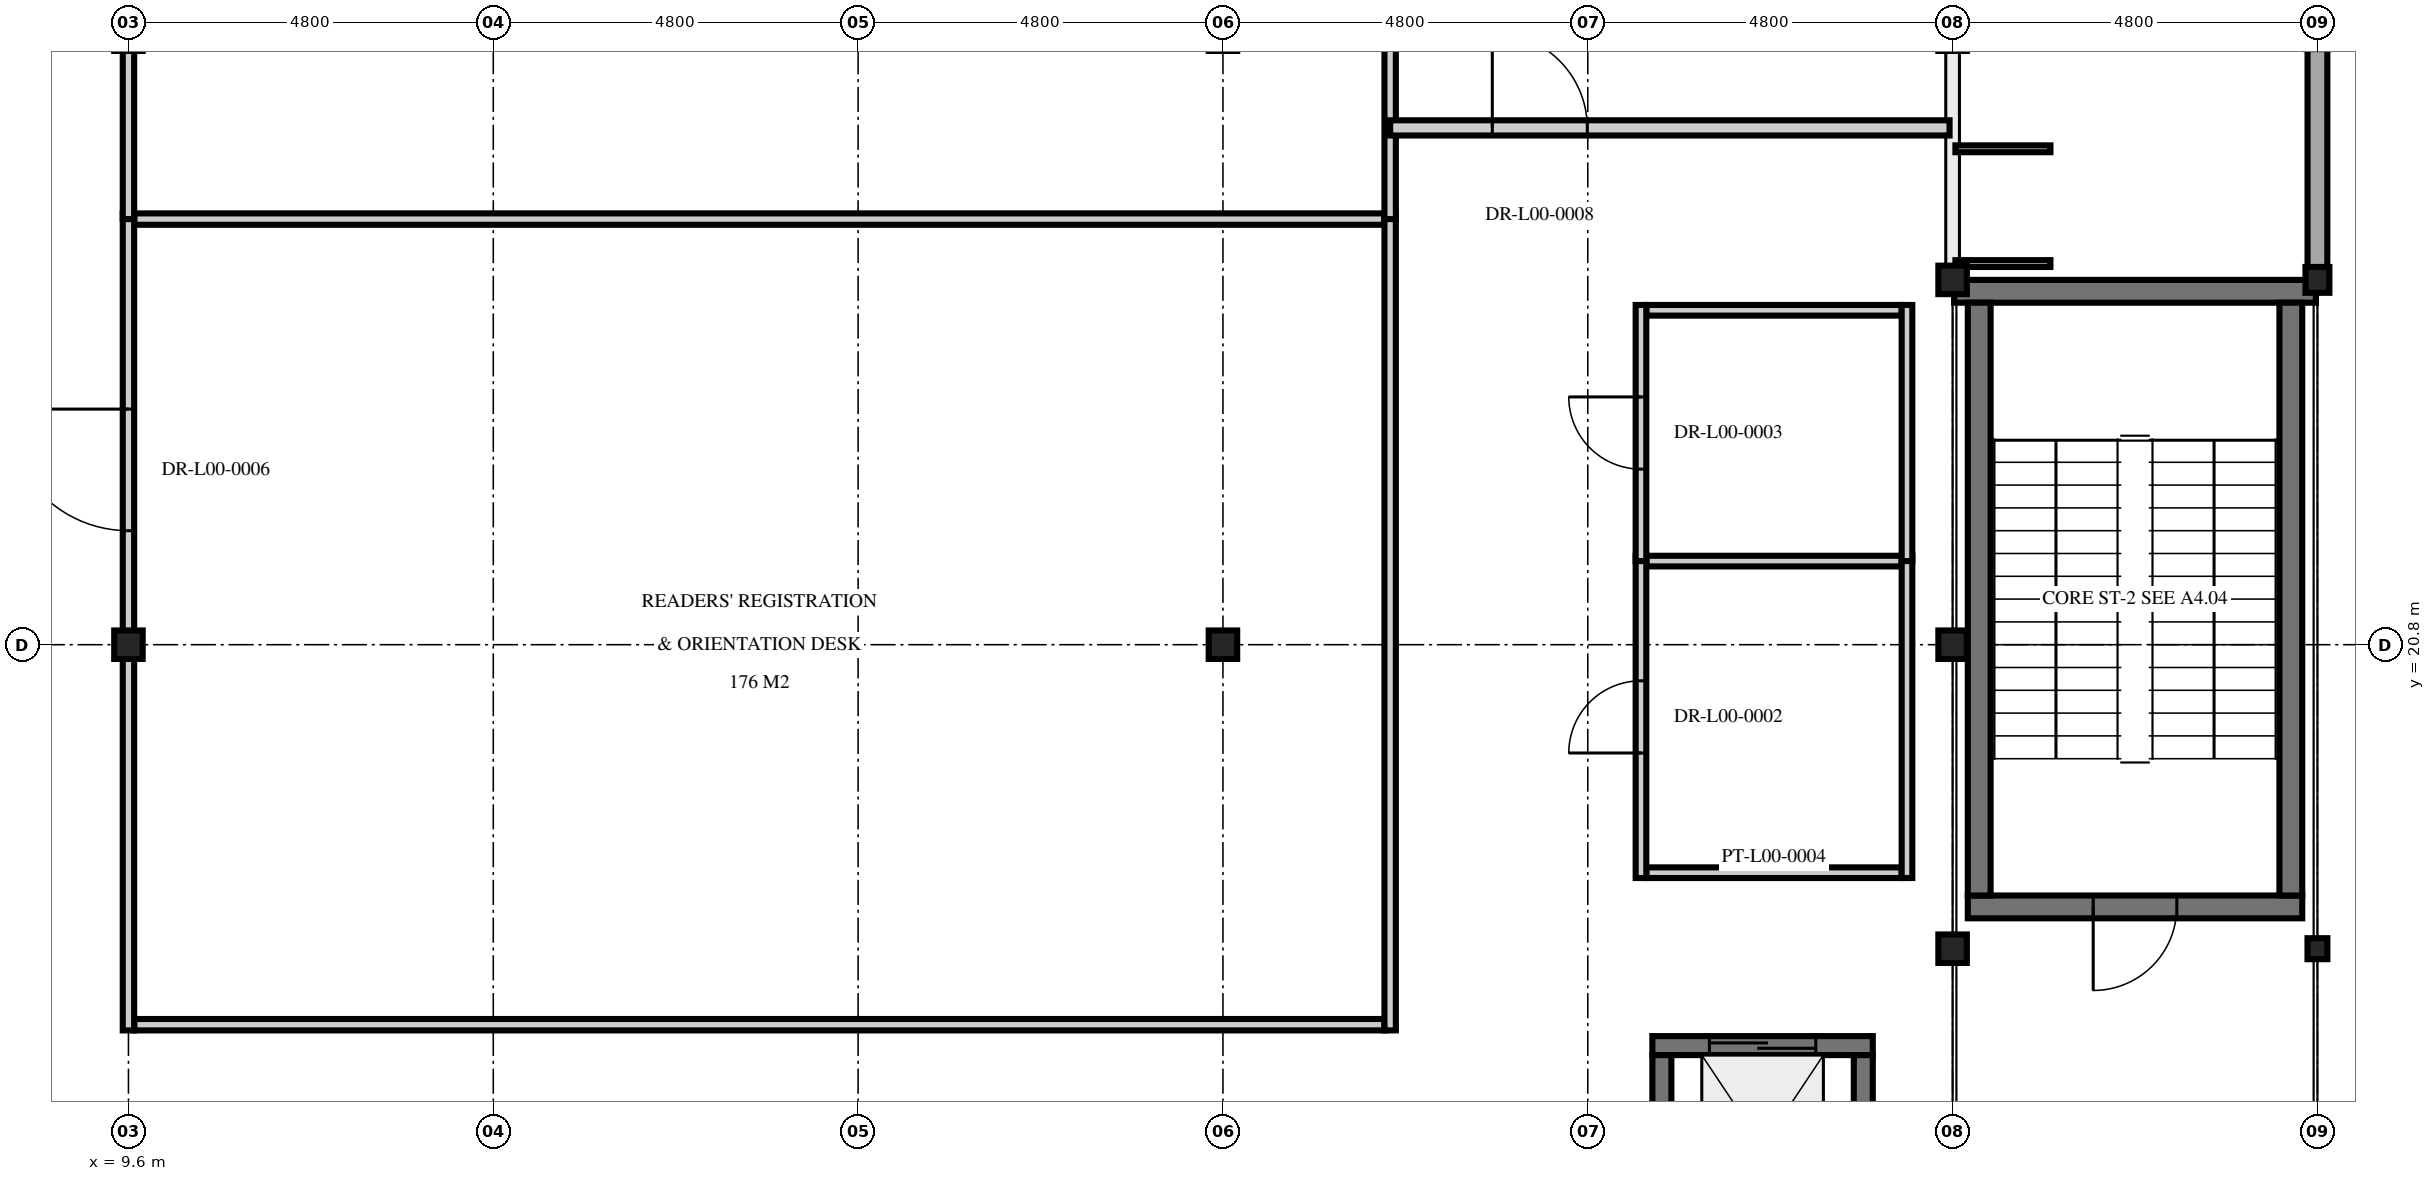
"""IFC4 building model, lengths in metres.
Left out: names, types, materials, properties, quantities, classifications, styles, units other than length and angle.
Written with IfcOpenShell. Run it as: python <this file> out.ifc"""

import sys

from ifc_helpers import new_model, si_unit, direction, frame, frame_2d, origin, origin_2d, place, context, subcontext, project, spatial, rectangle, i_section, extrude, element, fill, save


model = new_model("IFC4")
c1 = context("Model", 3, precision=1e-05, world=origin(), true_north=direction((0.0, 1.0)))
c2 = subcontext(c1, "Body", "Model", "MODEL_VIEW")
j1 = project(units=[si_unit("LENGTHUNIT", "METRE"), si_unit("PLANEANGLEUNIT", "RADIAN")], contexts=[c1])
p1 = place(None, origin())
s1 = spatial("IfcSite", under=j1, at=p1, CompositionType="ELEMENT")
p2 = place(p1, origin())
s2 = spatial("IfcBuilding", under=s1, at=p2, CompositionType="ELEMENT")
p3 = place(p2, origin())
s3 = spatial("IfcBuildingStorey", under=s2, at=p3, CompositionType="ELEMENT", Elevation=0.0)
for number, where, z_axis, x_axis in (
    (1, (33.6, 16.8, 0.0), (0.0, 0.0, 1.0), (1.0, 0.0, 0.0)),
    (2, (33.6, 20.8, 0.0), (0.0, 0.0, 1.0), (1.0, 0.0, 0.0)),
    (3, (33.6, 25.6, 0.0), (0.0, 0.0, 1.0), (1.0, 0.0, 0.0)),
    (4, (9.6, 20.8, 0.0), (0.0, 0.0, 1.0), (1.0, 0.0, 0.0)),
    (5, (24.0, 20.8, 0.0), (0.0, 0.0, 1.0), (1.0, 0.0, 0.0)),
):
    element("IfcColumn", number, at=place(p3, frame(where, z_axis=z_axis, x_axis=x_axis)), inside=s3, PredefinedType="COLUMN", context=c2, shape_type="SweptSolid", body=[
        extrude(i_section(OverallWidth=0.375, OverallDepth=0.375, WebThickness=0.017, FlangeThickness=0.027, at=origin_2d()), origin(), (0.0, 0.0, 1.0), 5.1),
    ])
p4 = place(p3, frame((38.4, 25.6, 0.0), z_axis=(0.0, 0.0, 1.0), x_axis=(1.0, 0.0, 0.0)))
e6 = element("IfcColumn", 6, at=p4, inside=s3, PredefinedType="COLUMN", context=c2, shape_type="SweptSolid", body=[
    extrude(i_section(OverallWidth=0.314, OverallDepth=0.34, WebThickness=0.019, FlangeThickness=0.031, at=origin_2d()), origin(), (0.0, 0.0, 1.0), 5.1),
])
p5 = place(p3, frame((38.4, 16.8, 0.0), z_axis=(0.0, 0.0, 1.0), x_axis=(1.0, 0.0, 0.0)))
e7 = element("IfcColumn", 7, at=p5, inside=s3, PredefinedType="COLUMN", context=c2, shape_type="SweptSolid", body=[
    extrude(i_section(OverallWidth=0.261, OverallDepth=0.276, WebThickness=0.015, FlangeThickness=0.025, at=origin_2d()), origin(), (0.0, 0.0, 1.0), 5.1),
])
p6 = place(p3, frame((38.2, 17.35, 0.0), z_axis=(0.0, 0.0, 1.0), x_axis=(-1.0, 0.0, 0.0)))
e8 = element("IfcWall", 8, at=p6, inside=s3, PredefinedType="SHEAR", context=c2, shape_type="SweptSolid", body=[
    extrude(rectangle(XDim=4.4, YDim=0.3, at=frame_2d((2.2, 0.0))), origin(), (0.0, 0.0, 1.0), 4.88),
])
p7 = place(p6, frame((1.65, 0.0, 0.0)))
e9 = element("IfcOpeningElement", 9, at=p7, cuts=e8, PredefinedType="OPENING", context=c2, shape_type="SweptSolid", body=[
    extrude(rectangle(XDim=1.1, YDim=2.2, at=frame_2d((0.55, 1.1))), frame((0.0, 0.16, 0.0), z_axis=(0.0, -1.0, 0.0), x_axis=(1.0, 0.0, 0.0)), (0.0, 0.0, 1.0), 0.32),
])
p8 = place(p3, frame((33.62, 25.45, 0.0), z_axis=(0.0, 0.0, 1.0), x_axis=(1.0, 0.0, 0.0)))
e10 = element("IfcWall", 10, at=p8, inside=s3, PredefinedType="SHEAR", context=c2, shape_type="SweptSolid", body=[
    extrude(rectangle(XDim=4.76, YDim=0.3, at=frame_2d((2.38, 0.0))), origin(), (0.0, 0.0, 1.0), 4.88),
])
for number, where, z_axis, x_axis in (
    (11, (33.95, 17.5, 0.0), (0.0, 0.0, 1.0), (0.0, 1.0, 0.0)),
    (12, (38.05, 25.3, 0.0), (0.0, 0.0, 1.0), (0.0, -1.0, 0.0)),
):
    element("IfcWall", number, at=place(p3, frame(where, z_axis=z_axis, x_axis=x_axis)), inside=s3, PredefinedType="SHEAR", context=c2, shape_type="SweptSolid", body=[
        extrude(rectangle(XDim=7.8, YDim=0.3, at=frame_2d((3.9, 0.0))), origin(), (0.0, 0.0, 1.0), 4.88),
    ])
p9 = place(p3, frame((29.65, 15.525, 0.0), z_axis=(0.0, 0.0, 1.0), x_axis=(1.0, 0.0, 0.0)))
e13 = element("IfcWall", 13, at=p9, inside=s3, PredefinedType="SHEAR", context=c2, shape_type="SweptSolid", body=[
    extrude(rectangle(XDim=2.9, YDim=0.25, at=frame_2d((1.45, 0.0))), origin(), (0.0, 0.0, 1.0), 4.88),
])
p10 = place(p9, frame((0.75, 0.0, 0.0)))
e14 = element("IfcOpeningElement", 14, at=p10, cuts=e13, PredefinedType="OPENING", context=c2, shape_type="SweptSolid", body=[
    extrude(rectangle(XDim=1.4, YDim=2.2, at=frame_2d((0.7, 1.1))), frame((0.0, 0.135, 0.0), z_axis=(0.0, -1.0, 0.0), x_axis=(1.0, 0.0, 0.0)), (0.0, 0.0, 1.0), 0.27),
])
for number, where, z_axis, x_axis in (
    (15, (29.775, 13.0, 0.0), (0.0, 0.0, 1.0), (0.0, 1.0, 0.0)),
    (16, (32.425, 15.4, 0.0), (0.0, 0.0, 1.0), (0.0, -1.0, 0.0)),
):
    element("IfcWall", number, at=place(p3, frame(where, z_axis=z_axis, x_axis=x_axis)), inside=s3, PredefinedType="SHEAR", context=c2, shape_type="SweptSolid", body=[
        extrude(rectangle(XDim=2.4, YDim=0.25, at=frame_2d((1.2, 0.0))), origin(), (0.0, 0.0, 1.0), 4.88),
    ])
p11 = place(p3, frame((38.4, 25.515, 0.0), z_axis=(0.0, 0.0, 1.0), x_axis=(0.0, 1.0, 0.0)))
e17 = element("IfcWall", 17, at=p11, inside=s3, PredefinedType="SOLIDWALL", context=c2, shape_type="SweptSolid", body=[
    extrude(rectangle(XDim=11.37, YDim=0.26, at=frame_2d((5.685, 0.0))), origin(), (0.0, 0.0, 1.0), 4.315),
])
for number, where, z_axis, x_axis in (
    (18, (29.57, 17.8, 0.0), (0.0, 0.0, 1.0), (1.0, 0.0, 0.0)),
    (19, (29.57, 21.9, 0.0), (0.0, 0.0, 1.0), (1.0, 0.0, 0.0)),
):
    element("IfcWall", number, at=place(p3, frame(where, z_axis=z_axis, x_axis=x_axis)), inside=s3, PredefinedType="PARTITIONING", context=c2, shape_type="SweptSolid", body=[
        extrude(rectangle(XDim=3.36, YDim=0.14, at=frame_2d((1.68, 0.0))), origin(), (0.0, 0.0, 1.0), 4.455),
    ])
p12 = place(p3, frame((29.5, 17.73, 0.0), z_axis=(0.0, 0.0, 1.0), x_axis=(0.0, 1.0, 0.0)))
e20 = element("IfcWall", 20, at=p12, inside=s3, PredefinedType="PARTITIONING", context=c2, shape_type="SweptSolid", body=[
    extrude(rectangle(XDim=4.24, YDim=0.14, at=frame_2d((2.12, 0.0))), origin(), (0.0, 0.0, 1.0), 4.305),
])
p13 = place(p12, frame((1.645, 0.0, 0.0)))
e21 = element("IfcOpeningElement", 21, at=p13, cuts=e20, PredefinedType="OPENING", context=c2, shape_type="SweptSolid", body=[
    extrude(rectangle(XDim=0.95, YDim=2.1, at=frame_2d((0.475, 1.05))), frame((0.0, 0.08, 0.0), z_axis=(0.0, -1.0, 0.0), x_axis=(1.0, 0.0, 0.0)), (0.0, 0.0, 1.0), 0.16),
])
p14 = place(p3, frame((33.0, 17.73, 0.0), z_axis=(0.0, 0.0, 1.0), x_axis=(0.0, 1.0, 0.0)))
e22 = element("IfcWall", 22, at=p14, inside=s3, PredefinedType="PARTITIONING", context=c2, shape_type="SweptSolid", body=[
    extrude(rectangle(XDim=4.24, YDim=0.14, at=frame_2d((2.12, 0.0))), origin(), (0.0, 0.0, 1.0), 4.305),
])
p15 = place(p3, frame((29.57, 25.2, 0.0), z_axis=(0.0, 0.0, 1.0), x_axis=(1.0, 0.0, 0.0)))
e23 = element("IfcWall", 23, at=p15, inside=s3, PredefinedType="PARTITIONING", context=c2, shape_type="SweptSolid", body=[
    extrude(rectangle(XDim=3.36, YDim=0.14, at=frame_2d((1.68, 0.0))), origin(), (0.0, 0.0, 1.0), 4.455),
])
p16 = place(p3, frame((29.5, 21.9, 0.0), z_axis=(0.0, 0.0, 1.0), x_axis=(0.0, 1.0, 0.0)))
e24 = element("IfcWall", 24, at=p16, inside=s3, PredefinedType="PARTITIONING", context=c2, shape_type="SweptSolid", body=[
    extrude(rectangle(XDim=3.37, YDim=0.14, at=frame_2d((1.685, 0.0))), origin(), (0.0, 0.0, 1.0), 4.88),
])
p17 = place(p16, frame((1.21, 0.0, 0.0)))
e25 = element("IfcOpeningElement", 25, at=p17, cuts=e24, PredefinedType="OPENING", context=c2, shape_type="SweptSolid", body=[
    extrude(rectangle(XDim=0.95, YDim=2.1, at=frame_2d((0.475, 1.05))), frame((0.0, 0.08, 0.0), z_axis=(0.0, -1.0, 0.0), x_axis=(1.0, 0.0, 0.0)), (0.0, 0.0, 1.0), 0.16),
])
p18 = place(p3, frame((33.0, 21.9, 0.0), z_axis=(0.0, 0.0, 1.0), x_axis=(0.0, 1.0, 0.0)))
e26 = element("IfcWall", 26, at=p18, inside=s3, PredefinedType="PARTITIONING", context=c2, shape_type="SweptSolid", body=[
    extrude(rectangle(XDim=3.37, YDim=0.14, at=frame_2d((1.685, 0.0))), origin(), (0.0, 0.0, 1.0), 4.88),
])
for number, where, z_axis, x_axis in (
    (27, (9.675, 15.8, 0.0), (0.0, 0.0, 1.0), (1.0, 0.0, 0.0)),
    (28, (9.675, 26.4, 0.0), (0.0, 0.0, 1.0), (1.0, 0.0, 0.0)),
):
    element("IfcWall", number, at=place(p3, frame(where, z_axis=z_axis, x_axis=x_axis)), inside=s3, PredefinedType="PARTITIONING", context=c2, shape_type="SweptSolid", body=[
        extrude(rectangle(XDim=16.45, YDim=0.15, at=frame_2d((8.225, 0.0))), origin(), (0.0, 0.0, 1.0), 4.405),
    ])
p19 = place(p3, frame((9.6, 15.725, 0.0), z_axis=(0.0, 0.0, 1.0), x_axis=(0.0, 1.0, 0.0)))
e29 = element("IfcWall", 29, at=p19, inside=s3, PredefinedType="PARTITIONING", context=c2, shape_type="SweptSolid", body=[
    extrude(rectangle(XDim=10.75, YDim=0.15, at=frame_2d((5.375, 0.0))), origin(), (0.0, 0.0, 1.0), 4.305),
])
p20 = place(p19, frame((6.575, 0.0, 0.0)))
e30 = element("IfcOpeningElement", 30, at=p20, cuts=e29, PredefinedType="OPENING", context=c2, shape_type="SweptSolid", body=[
    extrude(rectangle(XDim=1.6, YDim=2.25, at=frame_2d((0.8, 1.125))), frame((0.0, 0.085, 0.0), z_axis=(0.0, -1.0, 0.0), x_axis=(1.0, 0.0, 0.0)), (0.0, 0.0, 1.0), 0.17),
])
p21 = place(p3, frame((26.2, 15.725, 0.0), z_axis=(0.0, 0.0, 1.0), x_axis=(0.0, 1.0, 0.0)))
e31 = element("IfcWall", 31, at=p21, inside=s3, PredefinedType="PARTITIONING", context=c2, shape_type="SweptSolid", body=[
    extrude(rectangle(XDim=10.75, YDim=0.15, at=frame_2d((5.375, 0.0))), origin(), (0.0, 0.0, 1.0), 4.305),
])
p22 = place(p3, frame((9.6, 26.4, 0.0), z_axis=(0.0, 0.0, 1.0), x_axis=(0.0, 1.0, 0.0)))
e32 = element("IfcWall", 32, at=p22, inside=s3, PredefinedType="PARTITIONING", context=c2, shape_type="SweptSolid", body=[
    extrude(rectangle(XDim=10.36, YDim=0.15, at=frame_2d((5.18, 0.0))), origin(), (0.0, 0.0, 1.0), 4.305),
])
p23 = place(p22, frame((4.38, 0.0, 0.0)))
e33 = element("IfcOpeningElement", 33, at=p23, cuts=e32, PredefinedType="OPENING", context=c2, shape_type="SweptSolid", body=[
    extrude(rectangle(XDim=1.6, YDim=2.25, at=frame_2d((0.8, 1.125))), frame((0.0, 0.085, 0.0), z_axis=(0.0, -1.0, 0.0), x_axis=(1.0, 0.0, 0.0)), (0.0, 0.0, 1.0), 0.17),
])
p24 = place(p3, frame((26.2, 26.4, 0.0), z_axis=(0.0, 0.0, 1.0), x_axis=(0.0, 1.0, 0.0)))
e34 = element("IfcWall", 34, at=p24, inside=s3, PredefinedType="PARTITIONING", context=c2, shape_type="SweptSolid", body=[
    extrude(rectangle(XDim=10.36, YDim=0.15, at=frame_2d((5.18, 0.0))), origin(), (0.0, 0.0, 1.0), 4.305),
])
p25 = place(p3, frame((26.2, 27.6, 0.0), z_axis=(0.0, 0.0, 1.0), x_axis=(1.0, 0.0, 0.0)))
e35 = element("IfcWall", 35, at=p25, inside=s3, PredefinedType="PARTITIONING", context=c2, shape_type="SweptSolid", body=[
    extrude(rectangle(XDim=7.36, YDim=0.2, at=frame_2d((3.68, 0.0))), origin(), (0.0, 0.0, 1.0), 4.405),
])
p26 = place(p25, frame((1.344, 0.0, 0.0)))
e36 = element("IfcOpeningElement", 36, at=p26, cuts=e35, PredefinedType="OPENING", context=c2, shape_type="SweptSolid", body=[
    extrude(rectangle(XDim=1.25, YDim=2.25, at=frame_2d((0.625, 1.125))), frame((0.0, 0.11, 0.0), z_axis=(0.0, -1.0, 0.0), x_axis=(1.0, 0.0, 0.0)), (0.0, 0.0, 1.0), 0.22),
])
p27 = place(p7, origin())
e37 = element("IfcDoor", 37, at=p27, inside=s3, OperationType="SINGLE_SWING_RIGHT", PredefinedType="DOOR", context=c2, shape_type="SweptSolid", body=[
    extrude(rectangle(XDim=1.1, YDim=2.2, at=frame_2d((0.55, 1.1))), frame((0.0, 0.025, 0.0), z_axis=(0.0, -1.0, 0.0), x_axis=(1.0, 0.0, 0.0)), (0.0, 0.0, 1.0), 0.05),
])
fill(e9, e37)
p28 = place(p10, origin())
e38 = element("IfcDoor", 38, at=p28, inside=s3, OperationType="DOUBLE_DOOR_SLIDING", PredefinedType="DOOR", context=c2, shape_type="SweptSolid", body=[
    extrude(rectangle(XDim=1.4, YDim=2.2, at=frame_2d((0.7, 1.1))), frame((0.0, 0.025, 0.0), z_axis=(0.0, -1.0, 0.0), x_axis=(1.0, 0.0, 0.0)), (0.0, 0.0, 1.0), 0.05),
])
fill(e14, e38)
p29 = place(p13, origin())
e39 = element("IfcDoor", 39, at=p29, inside=s3, OperationType="SINGLE_SWING_LEFT", PredefinedType="DOOR", context=c2, shape_type="SweptSolid", body=[
    extrude(rectangle(XDim=0.95, YDim=2.1, at=frame_2d((0.475, 1.05))), frame((0.0, 0.025, 0.0), z_axis=(0.0, -1.0, 0.0), x_axis=(1.0, 0.0, 0.0)), (0.0, 0.0, 1.0), 0.05),
])
fill(e21, e39)
p30 = place(p17, origin())
e40 = element("IfcDoor", 40, at=p30, inside=s3, OperationType="SINGLE_SWING_RIGHT", PredefinedType="DOOR", context=c2, shape_type="SweptSolid", body=[
    extrude(rectangle(XDim=0.95, YDim=2.1, at=frame_2d((0.475, 1.05))), frame((0.0, 0.025, 0.0), z_axis=(0.0, -1.0, 0.0), x_axis=(1.0, 0.0, 0.0)), (0.0, 0.0, 1.0), 0.05),
])
fill(e25, e40)
p31 = place(p20, origin())
e41 = element("IfcDoor", 41, at=p31, inside=s3, OperationType="DOUBLE_DOOR_SINGLE_SWING", PredefinedType="DOOR", context=c2, shape_type="SweptSolid", body=[
    extrude(rectangle(XDim=1.6, YDim=2.25, at=frame_2d((0.8, 1.125))), frame((0.0, 0.025, 0.0), z_axis=(0.0, -1.0, 0.0), x_axis=(1.0, 0.0, 0.0)), (0.0, 0.0, 1.0), 0.05),
])
fill(e30, e41)
p32 = place(p26, origin())
e42 = element("IfcDoor", 42, at=p32, inside=s3, OperationType="SINGLE_SWING_LEFT", PredefinedType="DOOR", context=c2, shape_type="SweptSolid", body=[
    extrude(rectangle(XDim=1.25, YDim=2.25, at=frame_2d((0.625, 1.125))), frame((0.0, 0.025, 0.0), z_axis=(0.0, -1.0, 0.0), x_axis=(1.0, 0.0, 0.0)), (0.0, 0.0, 1.0), 0.05),
])
fill(e36, e42)
save(model, sys.argv[1])
